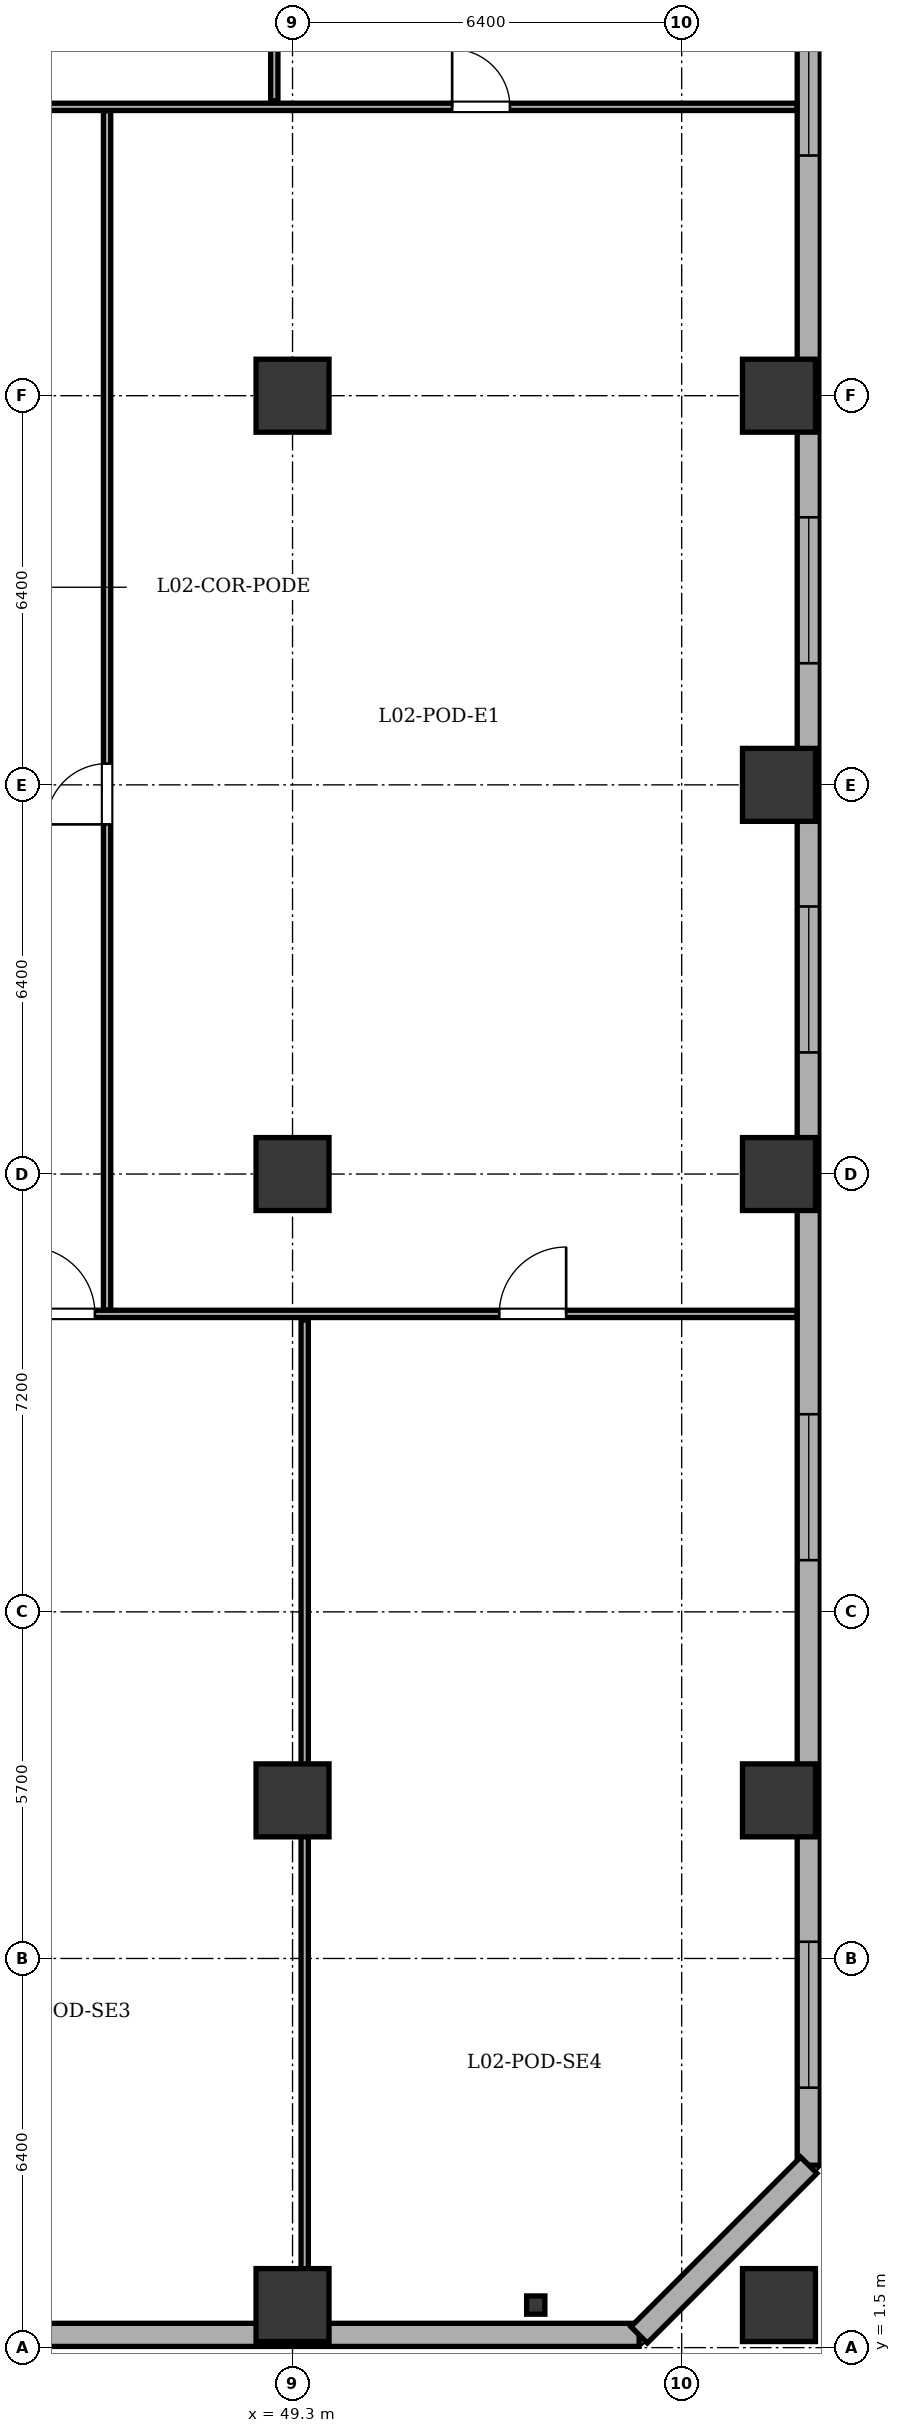
"""IFC4 building model, lengths in metres.
Left out: names, types, materials, properties, quantities, classifications, styles, units other than length and angle.
Written with IfcOpenShell. Run it as: python <this file> out.ifc"""

import sys

from ifc_helpers import new_model, si_unit, direction, frame, frame_2d, origin, origin_2d, place, context, subcontext, project, spatial, rectangle, i_section, extrude, element, fill, save


model = new_model("IFC4")
c1 = context("Model", 3, precision=1e-05, world=origin(), true_north=direction((0.0, 1.0)))
c2 = subcontext(c1, "Body", "Model", "MODEL_VIEW")
j1 = project(units=[si_unit("LENGTHUNIT", "METRE"), si_unit("PLANEANGLEUNIT", "RADIAN")], contexts=[c1])
p1 = place(None, origin())
s1 = spatial("IfcSite", under=j1, at=p1, CompositionType="ELEMENT")
p2 = place(p1, origin())
s2 = spatial("IfcBuilding", under=s1, at=p2, CompositionType="ELEMENT")
p3 = place(p2, frame((0.0, 0.0, 9.9)))
s3 = spatial("IfcBuildingStorey", under=s2, at=p3, CompositionType="ELEMENT", Elevation=9.9)
for number, where, z_axis, x_axis in (
    (1, (49.3, 2.2, 0.0), (0.0, 0.0, 1.0), (1.0, 0.0, 0.0)),
    (2, (57.3, 2.2, 0.0), (0.0, 0.0, 1.0), (1.0, 0.0, 0.0)),
    (3, (57.3, 10.5, 0.0), (0.0, 0.0, 1.0), (1.0, 0.0, 0.0)),
    (4, (57.3, 20.8, 0.0), (0.0, 0.0, 1.0), (1.0, 0.0, 0.0)),
    (5, (57.3, 27.2, 0.0), (0.0, 0.0, 1.0), (1.0, 0.0, 0.0)),
    (6, (57.3, 33.6, 0.0), (0.0, 0.0, 1.0), (1.0, 0.0, 0.0)),
    (7, (49.3, 10.5, 0.0), (0.0, 0.0, 1.0), (1.0, 0.0, 0.0)),
    (8, (49.3, 20.8, 0.0), (0.0, 0.0, 1.0), (1.0, 0.0, 0.0)),
    (9, (49.3, 33.6, 0.0), (0.0, 0.0, 1.0), (1.0, 0.0, 0.0)),
):
    element("IfcColumn", number, at=place(p3, frame(where, z_axis=z_axis, x_axis=x_axis)), inside=s3, PredefinedType="COLUMN", context=c2, shape_type="SweptSolid", body=[
        extrude(rectangle(XDim=1.2, YDim=1.2, at=origin_2d()), origin(), (0.0, 0.0, 1.0), 4.5),
    ])
p4 = place(p3, frame((53.3, 2.2, 0.0), z_axis=(0.0, 0.0, 1.0), x_axis=(1.0, 0.0, 0.0)))
e10 = element("IfcColumn", 10, at=p4, inside=s3, PredefinedType="PILASTER", context=c2, shape_type="SweptSolid", body=[
    extrude(i_section(OverallWidth=0.3, OverallDepth=0.3, WebThickness=0.011, FlangeThickness=0.019, at=origin_2d()), origin(), (0.0, 0.0, 1.0), 4.18),
])
p5 = place(p3, frame((55.0, 1.71, 0.0), z_axis=(0.0, 0.0, 1.0), x_axis=(-1.0, 0.0, 0.0)))
e11 = element("IfcWall", 11, at=p5, inside=s3, PredefinedType="STANDARD", context=c2, shape_type="SweptSolid", body=[
    extrude(rectangle(XDim=49.6, YDim=0.38, at=frame_2d((24.8, 0.0))), origin(), (0.0, 0.0, 1.0), 4.18),
])
p6 = place(p3, frame((57.79, 49.9, 0.0), z_axis=(0.0, 0.0, 1.0), x_axis=(0.0, -1.0, 0.0)))
e12 = element("IfcWall", 12, at=p6, inside=s3, PredefinedType="STANDARD", context=c2, shape_type="SweptSolid", body=[
    extrude(rectangle(XDim=45.4, YDim=0.38, at=frame_2d((22.7, 0.0))), origin(), (0.0, 0.0, 1.0), 4.18),
])
p7 = place(p6, frame((1.275, 0.0, 0.75)))
e13 = element("IfcOpeningElement", 13, at=p7, cuts=e12, PredefinedType="OPENING", context=c2, shape_type="SweptSolid", body=[
    extrude(rectangle(XDim=2.4, YDim=2.1, at=frame_2d((1.2, 1.05))), frame((0.0, 0.2, 0.0), z_axis=(0.0, -1.0, 0.0), x_axis=(1.0, 0.0, 0.0)), (0.0, 0.0, 1.0), 0.4),
])
p8 = place(p6, frame((9.95, 0.0, 0.75)))
e14 = element("IfcOpeningElement", 14, at=p8, cuts=e12, PredefinedType="OPENING", context=c2, shape_type="SweptSolid", body=[
    extrude(rectangle(XDim=2.4, YDim=2.1, at=frame_2d((1.2, 1.05))), frame((0.0, 0.2, 0.0), z_axis=(0.0, -1.0, 0.0), x_axis=(1.0, 0.0, 0.0)), (0.0, 0.0, 1.0), 0.4),
])
p9 = place(p6, frame((18.3, 0.0, 0.75)))
e15 = element("IfcOpeningElement", 15, at=p9, cuts=e12, PredefinedType="OPENING", context=c2, shape_type="SweptSolid", body=[
    extrude(rectangle(XDim=2.4, YDim=2.1, at=frame_2d((1.2, 1.05))), frame((0.0, 0.2, 0.0), z_axis=(0.0, -1.0, 0.0), x_axis=(1.0, 0.0, 0.0)), (0.0, 0.0, 1.0), 0.4),
])
p10 = place(p6, frame((24.7, 0.0, 0.75)))
e16 = element("IfcOpeningElement", 16, at=p10, cuts=e12, PredefinedType="OPENING", context=c2, shape_type="SweptSolid", body=[
    extrude(rectangle(XDim=2.4, YDim=2.1, at=frame_2d((1.2, 1.05))), frame((0.0, 0.2, 0.0), z_axis=(0.0, -1.0, 0.0), x_axis=(1.0, 0.0, 0.0)), (0.0, 0.0, 1.0), 0.4),
])
p11 = place(p6, frame((33.05, 0.0, 0.75)))
e17 = element("IfcOpeningElement", 17, at=p11, cuts=e12, PredefinedType="OPENING", context=c2, shape_type="SweptSolid", body=[
    extrude(rectangle(XDim=2.4, YDim=2.1, at=frame_2d((1.2, 1.05))), frame((0.0, 0.2, 0.0), z_axis=(0.0, -1.0, 0.0), x_axis=(1.0, 0.0, 0.0)), (0.0, 0.0, 1.0), 0.4),
])
p12 = place(p6, frame((41.725, 0.0, 0.75)))
e18 = element("IfcOpeningElement", 18, at=p12, cuts=e12, PredefinedType="OPENING", context=c2, shape_type="SweptSolid", body=[
    extrude(rectangle(XDim=2.4, YDim=2.1, at=frame_2d((1.2, 1.05))), frame((0.0, 0.2, 0.0), z_axis=(0.0, -1.0, 0.0), x_axis=(1.0, 0.0, 0.0)), (0.0, 0.0, 1.0), 0.4),
])
p13 = place(p3, frame((57.79, 4.5, 0.0), z_axis=(0.0, 0.0, 1.0), x_axis=(-0.707106781187, -0.707106781187, 0.0)))
e19 = element("IfcWall", 19, at=p13, inside=s3, PredefinedType="STANDARD", context=c2, shape_type="SweptSolid", body=[
    extrude(rectangle(XDim=3.946, YDim=0.38, at=frame_2d((1.973, 0.0))), origin(), (0.0, 0.0, 1.0), 4.18),
])
p14 = place(p3, frame((26.015, 18.5, 0.0), z_axis=(0.0, 0.0, 1.0), x_axis=(1.0, 0.0, 0.0)))
e20 = element("IfcWall", 20, at=p14, inside=s3, PredefinedType="PARTITIONING", context=c2, shape_type="SweptSolid", body=[
    extrude(rectangle(XDim=31.58, YDim=0.12, at=frame_2d((15.79, 0.0))), origin(), (0.0, 0.0, 1.0), 3.665),
])
p15 = place(p14, frame((3.11, 0.0, 0.0)))
e21 = element("IfcOpeningElement", 21, at=p15, cuts=e20, PredefinedType="OPENING", context=c2, shape_type="SweptSolid", body=[
    extrude(rectangle(XDim=1.1, YDim=2.15, at=frame_2d((0.55, 1.075))), frame((0.0, 0.07, 0.0), z_axis=(0.0, -1.0, 0.0), x_axis=(1.0, 0.0, 0.0)), (0.0, 0.0, 1.0), 0.14),
])
p16 = place(p14, frame((10.935, 0.0, 0.0)))
e22 = element("IfcOpeningElement", 22, at=p16, cuts=e20, PredefinedType="OPENING", context=c2, shape_type="SweptSolid", body=[
    extrude(rectangle(XDim=1.1, YDim=2.15, at=frame_2d((0.55, 1.075))), frame((0.0, 0.07, 0.0), z_axis=(0.0, -1.0, 0.0), x_axis=(1.0, 0.0, 0.0)), (0.0, 0.0, 1.0), 0.14),
])
p17 = place(p14, frame((18.935, 0.0, 0.0)))
e23 = element("IfcOpeningElement", 23, at=p17, cuts=e20, PredefinedType="OPENING", context=c2, shape_type="SweptSolid", body=[
    extrude(rectangle(XDim=1.1, YDim=2.15, at=frame_2d((0.55, 1.075))), frame((0.0, 0.07, 0.0), z_axis=(0.0, -1.0, 0.0), x_axis=(1.0, 0.0, 0.0)), (0.0, 0.0, 1.0), 0.14),
])
p18 = place(p14, frame((26.685, 0.0, 0.0)))
e24 = element("IfcOpeningElement", 24, at=p18, cuts=e20, PredefinedType="OPENING", context=c2, shape_type="SweptSolid", body=[
    extrude(rectangle(XDim=1.1, YDim=2.15, at=frame_2d((0.55, 1.075))), frame((0.0, 0.07, 0.0), z_axis=(0.0, -1.0, 0.0), x_axis=(1.0, 0.0, 0.0)), (0.0, 0.0, 1.0), 0.14),
])
p19 = place(p3, frame((49.5, 1.905, 0.0), z_axis=(0.0, 0.0, 1.0), x_axis=(0.0, 1.0, 0.0)))
e25 = element("IfcWall", 25, at=p19, inside=s3, PredefinedType="PARTITIONING", context=c2, shape_type="SweptSolid", body=[
    extrude(rectangle(XDim=16.495, YDim=0.12, at=frame_2d((8.248, 0.0))), origin(), (0.0, 0.0, 1.0), 3.065),
])
p20 = place(p3, frame((2.805, 38.35, 0.0), z_axis=(0.0, 0.0, 1.0), x_axis=(1.0, 0.0, 0.0)))
e26 = element("IfcWall", 26, at=p20, inside=s3, PredefinedType="PARTITIONING", context=c2, shape_type="SweptSolid", body=[
    extrude(rectangle(XDim=54.79, YDim=0.12, at=frame_2d((27.395, 0.0))), origin(), (0.0, 0.0, 1.0), 4.18),
])
p21 = place(p20, frame((4.57, 0.0, 0.0)))
e27 = element("IfcOpeningElement", 27, at=p21, cuts=e26, PredefinedType="OPENING", context=c2, shape_type="SweptSolid", body=[
    extrude(rectangle(XDim=0.95, YDim=2.1, at=frame_2d((0.475, 1.05))), frame((0.0, 0.07, 0.0), z_axis=(0.0, -1.0, 0.0), x_axis=(1.0, 0.0, 0.0)), (0.0, 0.0, 1.0), 0.14),
])
p22 = place(p20, frame((12.12, 0.0, 0.0)))
e28 = element("IfcOpeningElement", 28, at=p22, cuts=e26, PredefinedType="OPENING", context=c2, shape_type="SweptSolid", body=[
    extrude(rectangle(XDim=0.95, YDim=2.1, at=frame_2d((0.475, 1.05))), frame((0.0, 0.07, 0.0), z_axis=(0.0, -1.0, 0.0), x_axis=(1.0, 0.0, 0.0)), (0.0, 0.0, 1.0), 0.14),
])
p23 = place(p20, frame((17.12, 0.0, 0.0)))
e29 = element("IfcOpeningElement", 29, at=p23, cuts=e26, PredefinedType="OPENING", context=c2, shape_type="SweptSolid", body=[
    extrude(rectangle(XDim=0.95, YDim=2.1, at=frame_2d((0.475, 1.05))), frame((0.0, 0.07, 0.0), z_axis=(0.0, -1.0, 0.0), x_axis=(1.0, 0.0, 0.0)), (0.0, 0.0, 1.0), 0.14),
])
p24 = place(p20, frame((21.87, 0.0, 0.0)))
e30 = element("IfcOpeningElement", 30, at=p24, cuts=e26, PredefinedType="OPENING", context=c2, shape_type="SweptSolid", body=[
    extrude(rectangle(XDim=0.95, YDim=2.1, at=frame_2d((0.475, 1.05))), frame((0.0, 0.07, 0.0), z_axis=(0.0, -1.0, 0.0), x_axis=(1.0, 0.0, 0.0)), (0.0, 0.0, 1.0), 0.14),
])
p25 = place(p20, frame((29.87, 0.0, 0.0)))
e31 = element("IfcOpeningElement", 31, at=p25, cuts=e26, PredefinedType="OPENING", context=c2, shape_type="SweptSolid", body=[
    extrude(rectangle(XDim=0.95, YDim=2.1, at=frame_2d((0.475, 1.05))), frame((0.0, 0.07, 0.0), z_axis=(0.0, -1.0, 0.0), x_axis=(1.0, 0.0, 0.0)), (0.0, 0.0, 1.0), 0.14),
])
p26 = place(p20, frame((40.37, 0.0, 0.0)))
e32 = element("IfcOpeningElement", 32, at=p26, cuts=e26, PredefinedType="OPENING", context=c2, shape_type="SweptSolid", body=[
    extrude(rectangle(XDim=0.95, YDim=2.1, at=frame_2d((0.475, 1.05))), frame((0.0, 0.07, 0.0), z_axis=(0.0, -1.0, 0.0), x_axis=(1.0, 0.0, 0.0)), (0.0, 0.0, 1.0), 0.14),
])
p27 = place(p20, frame((49.12, 0.0, 0.0)))
e33 = element("IfcOpeningElement", 33, at=p27, cuts=e26, PredefinedType="OPENING", context=c2, shape_type="SweptSolid", body=[
    extrude(rectangle(XDim=0.95, YDim=2.1, at=frame_2d((0.475, 1.05))), frame((0.0, 0.07, 0.0), z_axis=(0.0, -1.0, 0.0), x_axis=(1.0, 0.0, 0.0)), (0.0, 0.0, 1.0), 0.14),
])
p28 = place(p3, frame((49.0, 38.45, 0.0), z_axis=(0.0, 0.0, 1.0), x_axis=(0.0, 1.0, 0.0)))
e34 = element("IfcWall", 34, at=p28, inside=s3, PredefinedType="PARTITIONING", context=c2, shape_type="SweptSolid", body=[
    extrude(rectangle(XDim=14.045, YDim=0.12, at=frame_2d((7.022, 0.0))), origin(), (0.0, 0.0, 1.0), 3.065),
])
p29 = place(p3, frame((46.25, 18.565, 0.0), z_axis=(0.0, 0.0, 1.0), x_axis=(0.0, 1.0, 0.0)))
e35 = element("IfcWall", 35, at=p29, inside=s3, PredefinedType="PARTITIONING", context=c2, shape_type="SweptSolid", body=[
    extrude(rectangle(XDim=19.72, YDim=0.12, at=frame_2d((9.86, 0.0))), origin(), (0.0, 0.0, 1.0), 4.18),
])
p30 = place(p29, frame((7.985, 0.0, 0.0)))
e36 = element("IfcOpeningElement", 36, at=p30, cuts=e35, PredefinedType="OPENING", context=c2, shape_type="SweptSolid", body=[
    extrude(rectangle(XDim=1.0, YDim=2.1, at=frame_2d((0.5, 1.05))), frame((0.0, 0.07, 0.0), z_axis=(0.0, -1.0, 0.0), x_axis=(1.0, 0.0, 0.0)), (0.0, 0.0, 1.0), 0.14),
])
p31 = place(p8, origin())
e37 = element("IfcWindow", 37, at=p31, inside=s3, PartitioningType="SINGLE_PANEL", PredefinedType="WINDOW", context=c2, shape_type="SweptSolid", body=[
    extrude(rectangle(XDim=2.4, YDim=2.1, at=frame_2d((1.2, 1.05))), frame((0.0, 0.03, 0.0), z_axis=(0.0, -1.0, 0.0), x_axis=(1.0, 0.0, 0.0)), (0.0, 0.0, 1.0), 0.06),
])
fill(e14, e37)
p32 = place(p9, origin())
e38 = element("IfcWindow", 38, at=p32, inside=s3, PartitioningType="SINGLE_PANEL", PredefinedType="WINDOW", context=c2, shape_type="SweptSolid", body=[
    extrude(rectangle(XDim=2.4, YDim=2.1, at=frame_2d((1.2, 1.05))), frame((0.0, 0.03, 0.0), z_axis=(0.0, -1.0, 0.0), x_axis=(1.0, 0.0, 0.0)), (0.0, 0.0, 1.0), 0.06),
])
fill(e15, e38)
p33 = place(p10, origin())
e39 = element("IfcWindow", 39, at=p33, inside=s3, PartitioningType="SINGLE_PANEL", PredefinedType="WINDOW", context=c2, shape_type="SweptSolid", body=[
    extrude(rectangle(XDim=2.4, YDim=2.1, at=frame_2d((1.2, 1.05))), frame((0.0, 0.03, 0.0), z_axis=(0.0, -1.0, 0.0), x_axis=(1.0, 0.0, 0.0)), (0.0, 0.0, 1.0), 0.06),
])
fill(e16, e39)
p34 = place(p11, origin())
e40 = element("IfcWindow", 40, at=p34, inside=s3, PartitioningType="SINGLE_PANEL", PredefinedType="WINDOW", context=c2, shape_type="SweptSolid", body=[
    extrude(rectangle(XDim=2.4, YDim=2.1, at=frame_2d((1.2, 1.05))), frame((0.0, 0.03, 0.0), z_axis=(0.0, -1.0, 0.0), x_axis=(1.0, 0.0, 0.0)), (0.0, 0.0, 1.0), 0.06),
])
fill(e17, e40)
p35 = place(p12, origin())
e41 = element("IfcWindow", 41, at=p35, inside=s3, PartitioningType="SINGLE_PANEL", PredefinedType="WINDOW", context=c2, shape_type="SweptSolid", body=[
    extrude(rectangle(XDim=2.4, YDim=2.1, at=frame_2d((1.2, 1.05))), frame((0.0, 0.03, 0.0), z_axis=(0.0, -1.0, 0.0), x_axis=(1.0, 0.0, 0.0)), (0.0, 0.0, 1.0), 0.06),
])
fill(e18, e41)
p36 = place(p17, origin())
e42 = element("IfcDoor", 42, at=p36, inside=s3, OperationType="SINGLE_SWING_LEFT", PredefinedType="DOOR", context=c2, shape_type="SweptSolid", body=[
    extrude(rectangle(XDim=1.1, YDim=2.15, at=frame_2d((0.55, 1.075))), frame((0.0, 0.025, 0.0), z_axis=(0.0, -1.0, 0.0), x_axis=(1.0, 0.0, 0.0)), (0.0, 0.0, 1.0), 0.05),
])
fill(e23, e42)
p37 = place(p18, origin())
e43 = element("IfcDoor", 43, at=p37, inside=s3, OperationType="SINGLE_SWING_RIGHT", PredefinedType="DOOR", context=c2, shape_type="SweptSolid", body=[
    extrude(rectangle(XDim=1.1, YDim=2.15, at=frame_2d((0.55, 1.075))), frame((0.0, 0.025, 0.0), z_axis=(0.0, -1.0, 0.0), x_axis=(1.0, 0.0, 0.0)), (0.0, 0.0, 1.0), 0.05),
])
fill(e24, e43)
p38 = place(p27, origin())
e44 = element("IfcDoor", 44, at=p38, inside=s3, OperationType="SINGLE_SWING_LEFT", PredefinedType="DOOR", context=c2, shape_type="SweptSolid", body=[
    extrude(rectangle(XDim=0.95, YDim=2.1, at=frame_2d((0.475, 1.05))), frame((0.0, 0.025, 0.0), z_axis=(0.0, -1.0, 0.0), x_axis=(1.0, 0.0, 0.0)), (0.0, 0.0, 1.0), 0.05),
])
fill(e33, e44)
p39 = place(p30, origin())
e45 = element("IfcDoor", 45, at=p39, inside=s3, OperationType="SINGLE_SWING_LEFT", PredefinedType="DOOR", context=c2, shape_type="SweptSolid", body=[
    extrude(rectangle(XDim=1.0, YDim=2.1, at=frame_2d((0.5, 1.05))), frame((0.0, 0.025, 0.0), z_axis=(0.0, -1.0, 0.0), x_axis=(1.0, 0.0, 0.0)), (0.0, 0.0, 1.0), 0.05),
])
fill(e36, e45)
save(model, sys.argv[1])
